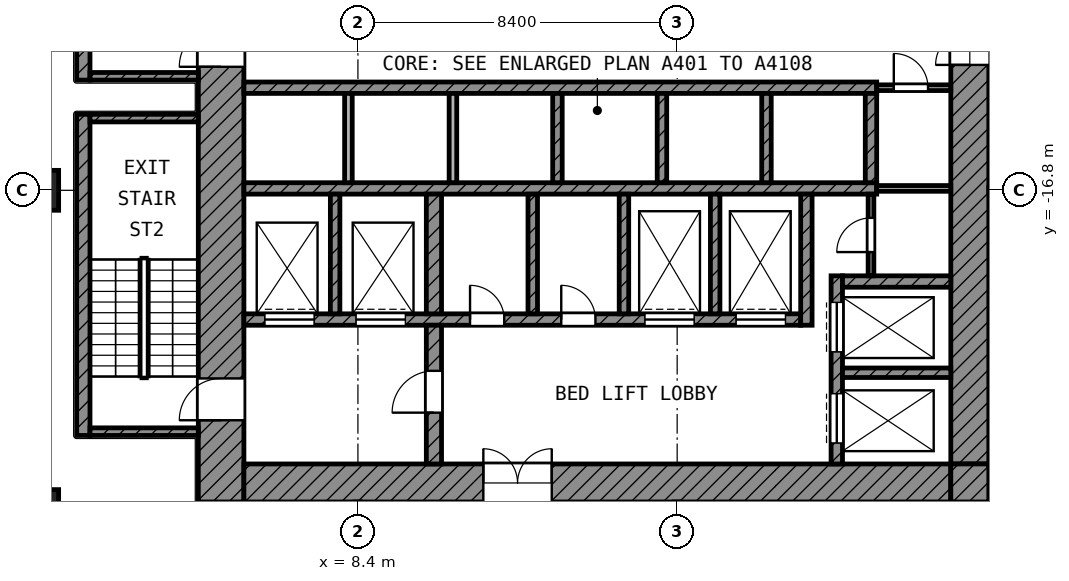
"""IFC4 building model, lengths in metres.
Left out: names, types, materials, properties, quantities, classifications, styles, units other than length and angle.
Written with IfcOpenShell. Run it as: python <this file> out.ifc"""

import sys

from ifc_helpers import new_model, si_unit, direction, frame, frame_2d, origin, origin_2d, place, context, subcontext, project, spatial, rectangle, extrude, element, fill, save


model = new_model("IFC4")
c1 = context("Model", 3, precision=1e-05, world=origin(), true_north=direction((0.0, 1.0)))
c2 = subcontext(c1, "Body", "Model", "MODEL_VIEW")
j1 = project(units=[si_unit("LENGTHUNIT", "METRE"), si_unit("PLANEANGLEUNIT", "RADIAN")], contexts=[c1])
p1 = place(None, origin())
s1 = spatial("IfcSite", under=j1, at=p1, CompositionType="ELEMENT")
p2 = place(p1, origin())
s2 = spatial("IfcBuilding", under=s1, at=p2, CompositionType="ELEMENT")
p3 = place(p2, frame((0.0, 0.0, 111.4)))
s3 = spatial("IfcBuildingStorey", under=s2, at=p3, CompositionType="ELEMENT", Elevation=111.4)
for number, where, z_axis, x_axis in (
    (1, (0.0, -16.8, 0.0), (0.0, 0.0, 1.0), (1.0, 0.0, 0.0)),
    (2, (0.0, -25.2, 0.0), (0.0, 0.0, 1.0), (1.0, 0.0, 0.0)),
):
    element("IfcColumn", number, at=place(p3, frame(where, z_axis=z_axis, x_axis=x_axis)), inside=s3, PredefinedType="COLUMN", context=c2, shape_type="SweptSolid", body=[
        extrude(rectangle(XDim=1.05, YDim=1.05, at=origin_2d()), origin(), (0.0, 0.0, 1.0), 4.2),
    ])
p4 = place(p3, frame((4.8, -25.0, 0.0), z_axis=(0.0, 0.0, 1.0), x_axis=(0.0, 1.0, 0.0)))
e3 = element("IfcWall", 3, at=p4, inside=s3, PredefinedType="SHEAR", context=c2, shape_type="SweptSolid", body=[
    extrude(rectangle(XDim=19.6, YDim=1.2, at=frame_2d((9.8, 0.0))), origin(), (0.0, 0.0, 1.0), 3.6),
])
p5 = place(p4, frame((11.45, 0.0, 0.0)))
e4 = element("IfcOpeningElement", 4, at=p5, cuts=e3, PredefinedType="OPENING", context=c2, shape_type="SweptSolid", body=[
    extrude(rectangle(XDim=1.1, YDim=2.1, at=frame_2d((0.55, 1.05))), frame((0.0, 0.61, 0.0), z_axis=(0.0, -1.0, 0.0), x_axis=(1.0, 0.0, 0.0)), (0.0, 0.0, 1.0), 1.22),
])
p6 = place(p4, frame((2.15, 0.0, 0.0)))
e5 = element("IfcOpeningElement", 5, at=p6, cuts=e3, PredefinedType="OPENING", context=c2, shape_type="SweptSolid", body=[
    extrude(rectangle(XDim=1.1, YDim=2.1, at=frame_2d((0.55, 1.05))), frame((0.0, 0.61, 0.0), z_axis=(0.0, -1.0, 0.0), x_axis=(1.0, 0.0, 0.0)), (0.0, 0.0, 1.0), 1.22),
])
p7 = place(p3, frame((24.5, -24.0, 0.0), z_axis=(0.0, 0.0, 1.0), x_axis=(0.0, 1.0, 0.0)))
e6 = element("IfcWall", 6, at=p7, inside=s3, PredefinedType="SHEAR", context=c2, shape_type="SweptSolid", body=[
    extrude(rectangle(XDim=18.6, YDim=1.0, at=frame_2d((9.3, 0.0))), origin(), (0.0, 0.0, 1.0), 3.6),
])
p8 = place(p7, frame((10.5, 0.0, 0.0)))
e7 = element("IfcOpeningElement", 7, at=p8, cuts=e6, PredefinedType="OPENING", context=c2, shape_type="SweptSolid", body=[
    extrude(rectangle(XDim=1.8, YDim=2.1, at=frame_2d((0.9, 1.05))), frame((0.0, 0.51, 0.0), z_axis=(0.0, -1.0, 0.0), x_axis=(1.0, 0.0, 0.0)), (0.0, 0.0, 1.0), 1.02),
])
p9 = place(p3, frame((5.4, -24.5, 0.0), z_axis=(0.0, 0.0, 1.0), x_axis=(1.0, 0.0, 0.0)))
e8 = element("IfcWall", 8, at=p9, inside=s3, PredefinedType="SHEAR", context=c2, shape_type="SweptSolid", body=[
    extrude(rectangle(XDim=18.6, YDim=1.0, at=frame_2d((9.3, 0.0))), origin(), (0.0, 0.0, 1.0), 3.6),
])
p10 = place(p9, frame((6.3, 0.0, 0.0)))
e9 = element("IfcOpeningElement", 9, at=p10, cuts=e8, PredefinedType="OPENING", context=c2, shape_type="SweptSolid", body=[
    extrude(rectangle(XDim=1.8, YDim=2.1, at=frame_2d((0.9, 1.05))), frame((0.0, 0.51, 0.0), z_axis=(0.0, -1.0, 0.0), x_axis=(1.0, 0.0, 0.0)), (0.0, 0.0, 1.0), 1.02),
])
p11 = place(p3, frame((24.5, -25.0, 0.0), z_axis=(0.0, 0.0, 1.0), x_axis=(0.0, 1.0, 0.0)))
e10 = element("IfcWall", 10, at=p11, inside=s3, PredefinedType="SHEAR", context=c2, shape_type="SweptSolid", body=[
    extrude(rectangle(XDim=1.0, YDim=1.0, at=frame_2d((0.5, 0.0))), origin(), (0.0, 0.0, 1.0), 3.6),
])
for number, where, z_axis, x_axis in (
    (11, (5.4, -14.1, 0.0), (0.0, 0.0, 1.0), (1.0, 0.0, 0.0)),
    (12, (5.4, -16.75, 0.0), (0.0, 0.0, 1.0), (1.0, 0.0, 0.0)),
):
    element("IfcWall", number, at=place(p3, frame(where, z_axis=z_axis, x_axis=x_axis)), inside=s3, PredefinedType="SHEAR", context=c2, shape_type="SweptSolid", body=[
        extrude(rectangle(XDim=16.65, YDim=0.3, at=frame_2d((8.325, 0.0))), origin(), (0.0, 0.0, 1.0), 3.6),
    ])
p12 = place(p3, frame((5.4, -20.2, 0.0), z_axis=(0.0, 0.0, 1.0), x_axis=(1.0, 0.0, 0.0)))
e13 = element("IfcWall", 13, at=p12, inside=s3, PredefinedType="SHEAR", context=c2, shape_type="SweptSolid", body=[
    extrude(rectangle(XDim=14.65, YDim=0.3, at=frame_2d((7.325, 0.0))), origin(), (0.0, 0.0, 1.0), 3.6),
])
p13 = place(p12, frame((10.55, 0.0, 0.0)))
e14 = element("IfcOpeningElement", 14, at=p13, cuts=e13, PredefinedType="OPENING", context=c2, shape_type="SweptSolid", body=[
    extrude(rectangle(XDim=1.3, YDim=2.1, at=frame_2d((0.65, 1.05))), frame((0.0, 0.16, 0.0), z_axis=(0.0, -1.0, 0.0), x_axis=(1.0, 0.0, 0.0)), (0.0, 0.0, 1.0), 0.32),
])
p14 = place(p12, frame((12.95, 0.0, 0.0)))
e15 = element("IfcOpeningElement", 15, at=p14, cuts=e13, PredefinedType="OPENING", context=c2, shape_type="SweptSolid", body=[
    extrude(rectangle(XDim=1.3, YDim=2.1, at=frame_2d((0.65, 1.05))), frame((0.0, 0.16, 0.0), z_axis=(0.0, -1.0, 0.0), x_axis=(1.0, 0.0, 0.0)), (0.0, 0.0, 1.0), 0.32),
])
p15 = place(p12, frame((0.55, 0.0, 0.0)))
e16 = element("IfcOpeningElement", 16, at=p15, cuts=e13, PredefinedType="OPENING", context=c2, shape_type="SweptSolid", body=[
    extrude(rectangle(XDim=1.3, YDim=2.1, at=frame_2d((0.65, 1.05))), frame((0.0, 0.16, 0.0), z_axis=(0.0, -1.0, 0.0), x_axis=(1.0, 0.0, 0.0)), (0.0, 0.0, 1.0), 0.32),
])
p16 = place(p12, frame((2.95, 0.0, 0.0)))
e17 = element("IfcOpeningElement", 17, at=p16, cuts=e13, PredefinedType="OPENING", context=c2, shape_type="SweptSolid", body=[
    extrude(rectangle(XDim=1.3, YDim=2.1, at=frame_2d((0.65, 1.05))), frame((0.0, 0.16, 0.0), z_axis=(0.0, -1.0, 0.0), x_axis=(1.0, 0.0, 0.0)), (0.0, 0.0, 1.0), 0.32),
])
p17 = place(p12, frame((5.95, 0.0, 0.0)))
e18 = element("IfcOpeningElement", 18, at=p17, cuts=e13, PredefinedType="OPENING", context=c2, shape_type="SweptSolid", body=[
    extrude(rectangle(XDim=0.9, YDim=2.1, at=frame_2d((0.45, 1.05))), frame((0.0, 0.16, 0.0), z_axis=(0.0, -1.0, 0.0), x_axis=(1.0, 0.0, 0.0)), (0.0, 0.0, 1.0), 0.32),
])
p18 = place(p12, frame((8.35, 0.0, 0.0)))
e19 = element("IfcOpeningElement", 19, at=p18, cuts=e13, PredefinedType="OPENING", context=c2, shape_type="SweptSolid", body=[
    extrude(rectangle(XDim=0.9, YDim=2.1, at=frame_2d((0.45, 1.05))), frame((0.0, 0.16, 0.0), z_axis=(0.0, -1.0, 0.0), x_axis=(1.0, 0.0, 0.0)), (0.0, 0.0, 1.0), 0.32),
])
p19 = place(p3, frame((10.4, -24.0, 0.0), z_axis=(0.0, 0.0, 1.0), x_axis=(0.0, 1.0, 0.0)))
e20 = element("IfcWall", 20, at=p19, inside=s3, PredefinedType="SHEAR", context=c2, shape_type="SweptSolid", body=[
    extrude(rectangle(XDim=3.65, YDim=0.4, at=frame_2d((1.825, 0.0))), origin(), (0.0, 0.0, 1.0), 3.6),
])
p20 = place(p19, frame((1.35, 0.0, 0.0)))
e21 = element("IfcOpeningElement", 21, at=p20, cuts=e20, PredefinedType="OPENING", context=c2, shape_type="SweptSolid", body=[
    extrude(rectangle(XDim=1.1, YDim=2.1, at=frame_2d((0.55, 1.05))), frame((0.0, 0.21, 0.0), z_axis=(0.0, -1.0, 0.0), x_axis=(1.0, 0.0, 0.0)), (0.0, 0.0, 1.0), 0.42),
])
p21 = place(p3, frame((10.4, -20.05, 0.0), z_axis=(0.0, 0.0, 1.0), x_axis=(0.0, 1.0, 0.0)))
e22 = element("IfcWall", 22, at=p21, inside=s3, PredefinedType="SHEAR", context=c2, shape_type="SweptSolid", body=[
    extrude(rectangle(XDim=3.15, YDim=0.4, at=frame_2d((1.575, 0.0))), origin(), (0.0, 0.0, 1.0), 3.6),
])
p22 = place(p3, frame((20.2, -20.35, 0.0), z_axis=(0.0, 0.0, 1.0), x_axis=(0.0, 1.0, 0.0)))
e23 = element("IfcWall", 23, at=p22, inside=s3, PredefinedType="SHEAR", context=c2, shape_type="SweptSolid", body=[
    extrude(rectangle(XDim=3.45, YDim=0.3, at=frame_2d((1.725, 0.0))), origin(), (0.0, 0.0, 1.0), 3.6),
])
p23 = place(p3, frame((21.9, -16.6, 0.0), z_axis=(0.0, 0.0, 1.0), x_axis=(0.0, 1.0, 0.0)))
e24 = element("IfcWall", 24, at=p23, inside=s3, PredefinedType="SHEAR", context=c2, shape_type="SweptSolid", body=[
    extrude(rectangle(XDim=2.35, YDim=0.3, at=frame_2d((1.175, 0.0))), origin(), (0.0, 0.0, 1.0), 3.6),
])
p24 = place(p3, frame((21.15, -19.2, 0.0), z_axis=(0.0, 0.0, 1.0), x_axis=(1.0, 0.0, 0.0)))
e25 = element("IfcWall", 25, at=p24, inside=s3, PredefinedType="SHEAR", context=c2, shape_type="SweptSolid", body=[
    extrude(rectangle(XDim=2.85, YDim=0.3, at=frame_2d((1.425, 0.0))), origin(), (0.0, 0.0, 1.0), 3.6),
])
p25 = place(p3, frame((21.0, -24.0, 0.0), z_axis=(0.0, 0.0, 1.0), x_axis=(0.0, 1.0, 0.0)))
e26 = element("IfcWall", 26, at=p25, inside=s3, PredefinedType="SHEAR", context=c2, shape_type="SweptSolid", body=[
    extrude(rectangle(XDim=4.95, YDim=0.3, at=frame_2d((2.475, 0.0))), origin(), (0.0, 0.0, 1.0), 3.6),
])
p26 = place(p25, frame((2.95, 0.0, 0.0)))
e27 = element("IfcOpeningElement", 27, at=p26, cuts=e26, PredefinedType="OPENING", context=c2, shape_type="SweptSolid", body=[
    extrude(rectangle(XDim=1.3, YDim=2.1, at=frame_2d((0.65, 1.05))), frame((0.0, 0.16, 0.0), z_axis=(0.0, -1.0, 0.0), x_axis=(1.0, 0.0, 0.0)), (0.0, 0.0, 1.0), 0.32),
])
p27 = place(p25, frame((0.55, 0.0, 0.0)))
e28 = element("IfcOpeningElement", 28, at=p27, cuts=e26, PredefinedType="OPENING", context=c2, shape_type="SweptSolid", body=[
    extrude(rectangle(XDim=1.3, YDim=2.1, at=frame_2d((0.65, 1.05))), frame((0.0, 0.16, 0.0), z_axis=(0.0, -1.0, 0.0), x_axis=(1.0, 0.0, 0.0)), (0.0, 0.0, 1.0), 0.32),
])
p28 = place(p3, frame((21.15, -21.6, 0.0), z_axis=(0.0, 0.0, 1.0), x_axis=(1.0, 0.0, 0.0)))
e29 = element("IfcWall", 29, at=p28, inside=s3, PredefinedType="SHEAR", context=c2, shape_type="SweptSolid", body=[
    extrude(rectangle(XDim=2.85, YDim=0.25, at=frame_2d((1.425, 0.0))), origin(), (0.0, 0.0, 1.0), 3.6),
])
for number, where, z_axis, x_axis in (
    (30, (7.8, -20.05, 0.0), (0.0, 0.0, 1.0), (0.0, 1.0, 0.0)),
    (31, (13.0, -20.05, 0.0), (0.0, 0.0, 1.0), (0.0, 1.0, 0.0)),
    (32, (15.4, -20.05, 0.0), (0.0, 0.0, 1.0), (0.0, 1.0, 0.0)),
    (33, (17.8, -20.05, 0.0), (0.0, 0.0, 1.0), (0.0, 1.0, 0.0)),
):
    element("IfcWall", number, at=place(p3, frame(where, z_axis=z_axis, x_axis=x_axis)), inside=s3, PredefinedType="SHEAR", context=c2, shape_type="SweptSolid", body=[
        extrude(rectangle(XDim=3.15, YDim=0.25, at=frame_2d((1.575, 0.0))), origin(), (0.0, 0.0, 1.0), 3.6),
    ])
for number, where, z_axis, x_axis in (
    (34, (8.15, -16.6, 0.0), (0.0, 0.0, 1.0), (0.0, 1.0, 0.0)),
    (35, (10.9, -16.6, 0.0), (0.0, 0.0, 1.0), (0.0, 1.0, 0.0)),
):
    element("IfcWall", number, at=place(p3, frame(where, z_axis=z_axis, x_axis=x_axis)), inside=s3, PredefinedType="PARTITIONING", context=c2, shape_type="SweptSolid", body=[
        extrude(rectangle(XDim=2.35, YDim=0.2, at=frame_2d((1.175, 0.0))), origin(), (0.0, 0.0, 1.0), 3.6),
    ])
for number, where, z_axis, x_axis in (
    (36, (13.65, -16.6, 0.0), (0.0, 0.0, 1.0), (0.0, 1.0, 0.0)),
    (37, (16.4, -16.6, 0.0), (0.0, 0.0, 1.0), (0.0, 1.0, 0.0)),
    (38, (19.15, -16.6, 0.0), (0.0, 0.0, 1.0), (0.0, 1.0, 0.0)),
):
    element("IfcWall", number, at=place(p3, frame(where, z_axis=z_axis, x_axis=x_axis)), inside=s3, PredefinedType="SHEAR", context=c2, shape_type="SweptSolid", body=[
        extrude(rectangle(XDim=2.35, YDim=0.25, at=frame_2d((1.175, 0.0))), origin(), (0.0, 0.0, 1.0), 3.6),
    ])
p29 = place(p3, frame((21.9, -19.05, 0.0), z_axis=(0.0, 0.0, 1.0), x_axis=(0.0, 1.0, 0.0)))
e39 = element("IfcWall", 39, at=p29, inside=s3, PredefinedType="PARTITIONING", context=c2, shape_type="SweptSolid", body=[
    extrude(rectangle(XDim=2.15, YDim=0.15, at=frame_2d((1.075, 0.0))), origin(), (0.0, 0.0, 1.0), 3.6),
])
p30 = place(p29, frame((0.625, 0.0, 0.0)))
e40 = element("IfcOpeningElement", 40, at=p30, cuts=e39, PredefinedType="OPENING", context=c2, shape_type="SweptSolid", body=[
    extrude(rectangle(XDim=0.9, YDim=2.1, at=frame_2d((0.45, 1.05))), frame((0.0, 0.085, 0.0), z_axis=(0.0, -1.0, 0.0), x_axis=(1.0, 0.0, 0.0)), (0.0, 0.0, 1.0), 0.17),
])
p31 = place(p3, frame((22.05, -16.75, 0.0), z_axis=(0.0, 0.0, 1.0), x_axis=(1.0, 0.0, 0.0)))
e41 = element("IfcWall", 41, at=p31, inside=s3, PredefinedType="PARTITIONING", context=c2, shape_type="SweptSolid", body=[
    extrude(rectangle(XDim=1.95, YDim=0.15, at=frame_2d((0.975, 0.0))), origin(), (0.0, 0.0, 1.0), 3.6),
])
p32 = place(p3, frame((22.05, -14.1, 0.0), z_axis=(0.0, 0.0, 1.0), x_axis=(1.0, 0.0, 0.0)))
e42 = element("IfcWall", 42, at=p32, inside=s3, PredefinedType="PARTITIONING", context=c2, shape_type="SweptSolid", body=[
    extrude(rectangle(XDim=1.95, YDim=0.15, at=frame_2d((0.975, 0.0))), origin(), (0.0, 0.0, 1.0), 3.6),
])
p33 = place(p32, frame((0.45, 0.0, 0.0)))
e43 = element("IfcOpeningElement", 43, at=p33, cuts=e42, PredefinedType="OPENING", context=c2, shape_type="SweptSolid", body=[
    extrude(rectangle(XDim=0.9, YDim=2.1, at=frame_2d((0.45, 1.05))), frame((0.0, 0.085, 0.0), z_axis=(0.0, -1.0, 0.0), x_axis=(1.0, 0.0, 0.0)), (0.0, 0.0, 1.0), 0.17),
])
p34 = place(p3, frame((1.175, -13.9, 0.0), z_axis=(0.0, 0.0, 1.0), x_axis=(0.0, 1.0, 0.0)))
e44 = element("IfcWall", 44, at=p34, inside=s3, PredefinedType="SHEAR", context=c2, shape_type="SweptSolid", body=[
    extrude(rectangle(XDim=8.45, YDim=0.35, at=frame_2d((4.225, 0.0))), origin(), (0.0, 0.0, 1.0), 3.6),
])
p35 = place(p3, frame((1.35, -13.8, 0.0), z_axis=(0.0, 0.0, 1.0), x_axis=(1.0, 0.0, 0.0)))
e45 = element("IfcWall", 45, at=p35, inside=s3, PredefinedType="SHEAR", context=c2, shape_type="SweptSolid", body=[
    extrude(rectangle(XDim=2.85, YDim=0.2, at=frame_2d((1.425, 0.0))), origin(), (0.0, 0.0, 1.0), 3.6),
])
p36 = place(p3, frame((1.175, -23.25, 0.0), z_axis=(0.0, 0.0, 1.0), x_axis=(0.0, 1.0, 0.0)))
e46 = element("IfcWall", 46, at=p36, inside=s3, PredefinedType="SHEAR", context=c2, shape_type="SweptSolid", body=[
    extrude(rectangle(XDim=8.45, YDim=0.35, at=frame_2d((4.225, 0.0))), origin(), (0.0, 0.0, 1.0), 3.6),
])
for number, where, z_axis, x_axis in (
    (47, (1.35, -14.9, 0.0), (0.0, 0.0, 1.0), (1.0, 0.0, 0.0)),
    (48, (1.35, -23.15, 0.0), (0.0, 0.0, 1.0), (1.0, 0.0, 0.0)),
):
    element("IfcWall", number, at=place(p3, frame(where, z_axis=z_axis, x_axis=x_axis)), inside=s3, PredefinedType="SHEAR", context=c2, shape_type="SweptSolid", body=[
        extrude(rectangle(XDim=2.85, YDim=0.2, at=frame_2d((1.425, 0.0))), origin(), (0.0, 0.0, 1.0), 3.6),
    ])
p37 = place(p3, frame((8.4, -31.782, 0.0), z_axis=(0.0, 0.0, 1.0), x_axis=(0.0, 1.0, 0.0)))
e49 = element("IfcWall", 49, at=p37, inside=s3, PredefinedType="PARTITIONING", context=c2, shape_type="SweptSolid", body=[
    extrude(rectangle(XDim=6.782, YDim=0.15, at=frame_2d((3.391, 0.0))), origin(), (0.0, 0.0, 1.0), 3.6),
])
p38 = place(p26, origin())
e50 = element("IfcDoor", 50, at=p38, inside=s3, OperationType="DOUBLE_DOOR_SLIDING", PredefinedType="DOOR", context=c2, shape_type="SweptSolid", body=[
    extrude(rectangle(XDim=1.3, YDim=2.1, at=frame_2d((0.65, 1.05))), frame((0.0, 0.025, 0.0), z_axis=(0.0, -1.0, 0.0), x_axis=(1.0, 0.0, 0.0)), (0.0, 0.0, 1.0), 0.05),
])
fill(e27, e50)
p39 = place(p27, origin())
e51 = element("IfcDoor", 51, at=p39, inside=s3, OperationType="DOUBLE_DOOR_SLIDING", PredefinedType="DOOR", context=c2, shape_type="SweptSolid", body=[
    extrude(rectangle(XDim=1.3, YDim=2.1, at=frame_2d((0.65, 1.05))), frame((0.0, 0.025, 0.0), z_axis=(0.0, -1.0, 0.0), x_axis=(1.0, 0.0, 0.0)), (0.0, 0.0, 1.0), 0.05),
])
fill(e28, e51)
p40 = place(p13, origin())
e52 = element("IfcDoor", 52, at=p40, inside=s3, OperationType="DOUBLE_DOOR_SLIDING", PredefinedType="DOOR", context=c2, shape_type="SweptSolid", body=[
    extrude(rectangle(XDim=1.3, YDim=2.1, at=frame_2d((0.65, 1.05))), frame((0.0, 0.025, 0.0), z_axis=(0.0, -1.0, 0.0), x_axis=(1.0, 0.0, 0.0)), (0.0, 0.0, 1.0), 0.05),
])
fill(e14, e52)
p41 = place(p14, origin())
e53 = element("IfcDoor", 53, at=p41, inside=s3, OperationType="DOUBLE_DOOR_SLIDING", PredefinedType="DOOR", context=c2, shape_type="SweptSolid", body=[
    extrude(rectangle(XDim=1.3, YDim=2.1, at=frame_2d((0.65, 1.05))), frame((0.0, 0.025, 0.0), z_axis=(0.0, -1.0, 0.0), x_axis=(1.0, 0.0, 0.0)), (0.0, 0.0, 1.0), 0.05),
])
fill(e15, e53)
p42 = place(p15, origin())
e54 = element("IfcDoor", 54, at=p42, inside=s3, OperationType="DOUBLE_DOOR_SLIDING", PredefinedType="DOOR", context=c2, shape_type="SweptSolid", body=[
    extrude(rectangle(XDim=1.3, YDim=2.1, at=frame_2d((0.65, 1.05))), frame((0.0, 0.025, 0.0), z_axis=(0.0, -1.0, 0.0), x_axis=(1.0, 0.0, 0.0)), (0.0, 0.0, 1.0), 0.05),
])
fill(e16, e54)
p43 = place(p16, origin())
e55 = element("IfcDoor", 55, at=p43, inside=s3, OperationType="DOUBLE_DOOR_SLIDING", PredefinedType="DOOR", context=c2, shape_type="SweptSolid", body=[
    extrude(rectangle(XDim=1.3, YDim=2.1, at=frame_2d((0.65, 1.05))), frame((0.0, 0.025, 0.0), z_axis=(0.0, -1.0, 0.0), x_axis=(1.0, 0.0, 0.0)), (0.0, 0.0, 1.0), 0.05),
])
fill(e17, e55)
p44 = place(p5, origin())
e56 = element("IfcDoor", 56, at=p44, inside=s3, OperationType="SINGLE_SWING_LEFT", PredefinedType="DOOR", context=c2, shape_type="SweptSolid", body=[
    extrude(rectangle(XDim=1.1, YDim=2.1, at=frame_2d((0.55, 1.05))), frame((0.0, 0.025, 0.0), z_axis=(0.0, -1.0, 0.0), x_axis=(1.0, 0.0, 0.0)), (0.0, 0.0, 1.0), 0.05),
])
fill(e4, e56)
p45 = place(p6, origin())
e57 = element("IfcDoor", 57, at=p45, inside=s3, OperationType="SINGLE_SWING_LEFT", PredefinedType="DOOR", context=c2, shape_type="SweptSolid", body=[
    extrude(rectangle(XDim=1.1, YDim=2.1, at=frame_2d((0.55, 1.05))), frame((0.0, 0.025, 0.0), z_axis=(0.0, -1.0, 0.0), x_axis=(1.0, 0.0, 0.0)), (0.0, 0.0, 1.0), 0.05),
])
fill(e5, e57)
p46 = place(p20, origin())
e58 = element("IfcDoor", 58, at=p46, inside=s3, OperationType="SINGLE_SWING_LEFT", PredefinedType="DOOR", context=c2, shape_type="SweptSolid", body=[
    extrude(rectangle(XDim=1.1, YDim=2.1, at=frame_2d((0.55, 1.05))), frame((0.0, 0.025, 0.0), z_axis=(0.0, -1.0, 0.0), x_axis=(1.0, 0.0, 0.0)), (0.0, 0.0, 1.0), 0.05),
])
fill(e21, e58)
p47 = place(p8, origin())
e59 = element("IfcDoor", 59, at=p47, inside=s3, OperationType="DOUBLE_DOOR_SINGLE_SWING", PredefinedType="DOOR", context=c2, shape_type="SweptSolid", body=[
    extrude(rectangle(XDim=1.8, YDim=2.1, at=frame_2d((0.9, 1.05))), frame((0.0, 0.025, 0.0), z_axis=(0.0, -1.0, 0.0), x_axis=(1.0, 0.0, 0.0)), (0.0, 0.0, 1.0), 0.05),
])
fill(e7, e59)
p48 = place(p10, origin())
e60 = element("IfcDoor", 60, at=p48, inside=s3, OperationType="DOUBLE_DOOR_SINGLE_SWING", PredefinedType="DOOR", context=c2, shape_type="SweptSolid", body=[
    extrude(rectangle(XDim=1.8, YDim=2.1, at=frame_2d((0.9, 1.05))), frame((0.0, 0.025, 0.0), z_axis=(0.0, -1.0, 0.0), x_axis=(1.0, 0.0, 0.0)), (0.0, 0.0, 1.0), 0.05),
])
fill(e9, e60)
p49 = place(p33, origin())
e61 = element("IfcDoor", 61, at=p49, inside=s3, OperationType="SINGLE_SWING_LEFT", PredefinedType="DOOR", context=c2, shape_type="SweptSolid", body=[
    extrude(rectangle(XDim=0.9, YDim=2.1, at=frame_2d((0.45, 1.05))), frame((0.0, 0.025, 0.0), z_axis=(0.0, -1.0, 0.0), x_axis=(1.0, 0.0, 0.0)), (0.0, 0.0, 1.0), 0.05),
])
fill(e43, e61)
p50 = place(p30, origin())
e62 = element("IfcDoor", 62, at=p50, inside=s3, OperationType="SINGLE_SWING_LEFT", PredefinedType="DOOR", context=c2, shape_type="SweptSolid", body=[
    extrude(rectangle(XDim=0.9, YDim=2.1, at=frame_2d((0.45, 1.05))), frame((0.0, 0.025, 0.0), z_axis=(0.0, -1.0, 0.0), x_axis=(1.0, 0.0, 0.0)), (0.0, 0.0, 1.0), 0.05),
])
fill(e40, e62)
p51 = place(p17, origin())
e63 = element("IfcDoor", 63, at=p51, inside=s3, OperationType="SINGLE_SWING_LEFT", PredefinedType="DOOR", context=c2, shape_type="SweptSolid", body=[
    extrude(rectangle(XDim=0.9, YDim=2.1, at=frame_2d((0.45, 1.05))), frame((0.0, 0.025, 0.0), z_axis=(0.0, -1.0, 0.0), x_axis=(1.0, 0.0, 0.0)), (0.0, 0.0, 1.0), 0.05),
])
fill(e18, e63)
p52 = place(p18, origin())
e64 = element("IfcDoor", 64, at=p52, inside=s3, OperationType="SINGLE_SWING_LEFT", PredefinedType="DOOR", context=c2, shape_type="SweptSolid", body=[
    extrude(rectangle(XDim=0.9, YDim=2.1, at=frame_2d((0.45, 1.05))), frame((0.0, 0.025, 0.0), z_axis=(0.0, -1.0, 0.0), x_axis=(1.0, 0.0, 0.0)), (0.0, 0.0, 1.0), 0.05),
])
fill(e19, e64)
save(model, sys.argv[1])
